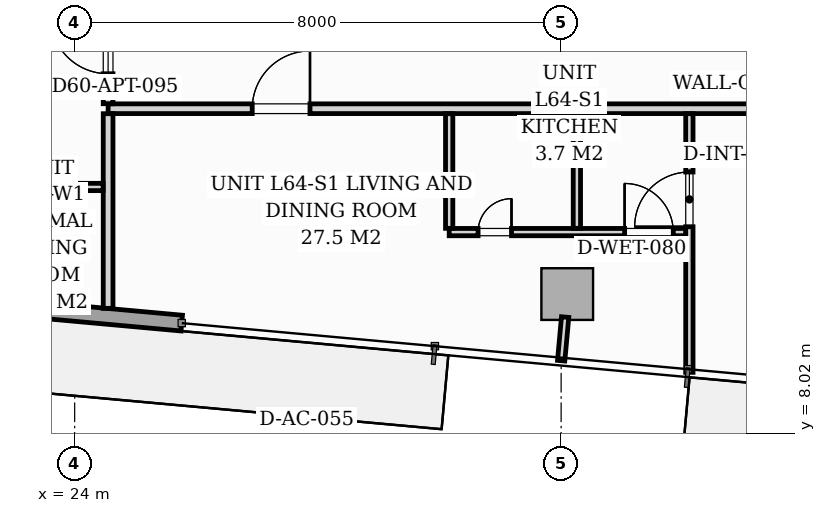
"""IFC4 building model, lengths in metres.
Left out: names, types, materials, properties, quantities, classifications, styles, units other than length and angle.
Written with IfcOpenShell. Run it as: python <this file> out.ifc"""

import sys

from ifc_helpers import new_model, si_unit, direction, frame, frame_2d, origin, origin_2d, place, context, subcontext, project, spatial, rectangle, extrude, source, transform, mapped, element, fill, save


model = new_model("IFC4")
c1 = context("Model", 3, precision=1e-05, world=origin(), true_north=direction((0.0, 1.0)))
c2 = subcontext(c1, "Body", "Model", "MODEL_VIEW")
j1 = project(units=[si_unit("LENGTHUNIT", "METRE"), si_unit("PLANEANGLEUNIT", "RADIAN")], contexts=[c1])
p1 = place(None, origin())
s1 = spatial("IfcSite", under=j1, at=p1, CompositionType="ELEMENT")
p2 = place(p1, origin())
s2 = spatial("IfcBuilding", under=s1, at=p2, CompositionType="ELEMENT")
p3 = place(p2, frame((0.0, 0.0, 223.2)))
s3 = spatial("IfcBuildingStorey", under=s2, at=p3, CompositionType="ELEMENT", Elevation=223.2)
m1 = source(origin(), c2, "Body", "SweptSolid", [
    extrude(rectangle(XDim=0.85, YDim=0.85, at=origin_2d()), origin(), (0.0, 0.0, 1.0), 3.296),
])
p4 = place(p3, frame((32.1, 10.312, 0.002), z_axis=(0.0, 0.0, 1.0), x_axis=(0.995884398616, -0.090632580198, 0.0)))
e1 = element("IfcColumn", 1, at=p4, inside=s3, PredefinedType="COLUMN", context=c2, shape_type="MappedRepresentation", body=[
    mapped(m1, transform((0.0, 0.0, 0.0), scale=1.0)),
])
p5 = place(p3, frame((25.761, 9.834, 0.0), z_axis=(0.0, 0.0, 1.0), x_axis=(-0.995884584572, 0.090630536861, 0.0)))
e2 = element("IfcWall", 2, at=p5, inside=s3, PredefinedType="STANDARD", context=c2, shape_type="SweptSolid", body=[
    extrude(rectangle(XDim=14.63, YDim=0.26, at=frame_2d((7.315, 0.0))), origin(), (0.0, 0.0, 1.0), 3.04),
])
p6 = place(p5, frame((6.09, 0.0, 0.0)))
e3 = element("IfcOpeningElement", 3, at=p6, cuts=e2, PredefinedType="OPENING", context=c2, shape_type="SweptSolid", body=[
    extrude(rectangle(XDim=1.8, YDim=2.06, at=frame_2d((0.9, 1.03))), frame((0.0, 0.14, 0.0), z_axis=(0.0, -1.0, 0.0), x_axis=(1.0, 0.0, 0.0)), (0.0, 0.0, 1.0), 0.28),
])
p7 = place(p5, frame((8.35, 0.0, 0.65)))
e4 = element("IfcOpeningElement", 4, at=p7, cuts=e2, PredefinedType="OPENING", context=c2, shape_type="SweptSolid", body=[
    extrude(rectangle(XDim=1.6, YDim=1.5, at=frame_2d((0.8, 0.75))), frame((0.0, 0.14, 0.0), z_axis=(0.0, -1.0, 0.0), x_axis=(1.0, 0.0, 0.0)), (0.0, 0.0, 1.0), 0.28),
])
p8 = place(p3, frame((24.55, 13.36, 0.0), z_axis=(0.0, 0.0, 1.0), x_axis=(1.0, 0.0, 0.0)))
e5 = element("IfcWall", 5, at=p8, inside=s3, PredefinedType="PARTITIONING", context=c2, shape_type="SweptSolid", body=[
    extrude(rectangle(XDim=21.33, YDim=0.16, at=frame_2d((10.665, 0.0))), origin(), (0.0, 0.0, 1.0), 2.596),
])
p9 = place(p8, frame((2.37, 0.0, 0.0)))
e6 = element("IfcOpeningElement", 6, at=p9, cuts=e5, PredefinedType="OPENING", context=c2, shape_type="SweptSolid", body=[
    extrude(rectangle(XDim=0.95, YDim=2.06, at=frame_2d((0.475, 1.03))), frame((0.0, 0.09, 0.0), z_axis=(0.0, -1.0, 0.0), x_axis=(1.0, 0.0, 0.0)), (0.0, 0.0, 1.0), 0.18),
])
p10 = place(p8, frame((13.707, 0.0, 0.0)))
e7 = element("IfcOpeningElement", 7, at=p10, cuts=e5, PredefinedType="OPENING", context=c2, shape_type="SweptSolid", body=[
    extrude(rectangle(XDim=0.95, YDim=2.06, at=frame_2d((0.475, 1.03))), frame((0.0, 0.09, 0.0), z_axis=(0.0, -1.0, 0.0), x_axis=(1.0, 0.0, 0.0)), (0.0, 0.0, 1.0), 0.18),
])
p11 = place(p3, frame((24.55, 10.077, 0.0), z_axis=(0.0, 0.0, 1.0), x_axis=(0.0, 1.0, 0.0)))
e8 = element("IfcWall", 8, at=p11, inside=s3, PredefinedType="PARTITIONING", context=c2, shape_type="SweptSolid", body=[
    extrude(rectangle(XDim=3.201, YDim=0.16, at=frame_2d((1.601, 0.0))), origin(), (0.0, 0.0, 1.0), 3.04),
])
p12 = place(p3, frame((24.55, 13.442, 0.0), z_axis=(0.0, 0.0, 1.0), x_axis=(0.0, 1.0, 0.0)))
e9 = element("IfcWall", 9, at=p12, inside=s3, PredefinedType="PARTITIONING", context=c2, shape_type="SweptSolid", body=[
    extrude(rectangle(XDim=7.208, YDim=0.16, at=frame_2d((3.604, 0.0))), origin(), (0.0, 0.0, 1.0), 3.04),
])
p13 = place(p12, frame((0.493, 0.0, 0.0)))
e10 = element("IfcOpeningElement", 10, at=p13, cuts=e9, PredefinedType="OPENING", context=c2, shape_type="SweptSolid", body=[
    extrude(rectangle(XDim=0.95, YDim=2.06, at=frame_2d((0.475, 1.03))), frame((0.0, 0.09, 0.0), z_axis=(0.0, -1.0, 0.0), x_axis=(1.0, 0.0, 0.0)), (0.0, 0.0, 1.0), 0.18),
])
p14 = place(p12, frame((4.721, 0.0, 0.0)))
e11 = element("IfcOpeningElement", 11, at=p14, cuts=e9, PredefinedType="OPENING", context=c2, shape_type="SweptSolid", body=[
    extrude(rectangle(XDim=0.95, YDim=2.06, at=frame_2d((0.475, 1.03))), frame((0.0, 0.09, 0.0), z_axis=(0.0, -1.0, 0.0), x_axis=(1.0, 0.0, 0.0)), (0.0, 0.0, 1.0), 0.18),
])
p15 = place(p3, frame((34.109, 9.024, 0.0), z_axis=(0.0, 0.0, 1.0), x_axis=(0.0, 1.0, 0.0)))
e12 = element("IfcWall", 12, at=p15, inside=s3, PredefinedType="PARTITIONING", context=c2, shape_type="SweptSolid", body=[
    extrude(rectangle(XDim=4.254, YDim=0.12, at=frame_2d((2.127, 0.0))), origin(), (0.0, 0.0, 1.0), 3.04),
])
p16 = place(p15, frame((2.395, 0.0, 0.0)))
e13 = element("IfcOpeningElement", 13, at=p16, cuts=e12, PredefinedType="OPENING", context=c2, shape_type="SweptSolid", body=[
    extrude(rectangle(XDim=0.9, YDim=2.05, at=frame_2d((0.45, 1.025))), frame((0.0, 0.07, 0.0), z_axis=(0.0, -1.0, 0.0), x_axis=(1.0, 0.0, 0.0)), (0.0, 0.0, 1.0), 0.14),
])
p17 = place(p3, frame((30.159, 11.331, 0.0), z_axis=(0.0, 0.0, 1.0), x_axis=(1.0, 0.0, 0.0)))
e14 = element("IfcWall", 14, at=p17, inside=s3, PredefinedType="PARTITIONING", context=c2, shape_type="SweptSolid", body=[
    extrude(rectangle(XDim=3.888, YDim=0.12, at=frame_2d((1.944, 0.0))), origin(), (0.0, 0.0, 1.0), 2.596),
])
p18 = place(p17, frame((0.475, 0.0, 0.0)))
e15 = element("IfcOpeningElement", 15, at=p18, cuts=e14, PredefinedType="OPENING", context=c2, shape_type="SweptSolid", body=[
    extrude(rectangle(XDim=0.55, YDim=2.0, at=frame_2d((0.275, 1.0))), frame((0.0, 0.07, 0.0), z_axis=(0.0, -1.0, 0.0), x_axis=(1.0, 0.0, 0.0)), (0.0, 0.0, 1.0), 0.14),
])
p19 = place(p17, frame((2.885, 0.0, 0.0)))
e16 = element("IfcOpeningElement", 16, at=p19, cuts=e14, PredefinedType="OPENING", context=c2, shape_type="SweptSolid", body=[
    extrude(rectangle(XDim=0.8, YDim=2.02, at=frame_2d((0.4, 1.01))), frame((0.0, 0.07, 0.0), z_axis=(0.0, -1.0, 0.0), x_axis=(1.0, 0.0, 0.0)), (0.0, 0.0, 1.0), 0.14),
])
p20 = place(p3, frame((32.259, 11.393, 0.0), z_axis=(0.0, 0.0, 1.0), x_axis=(0.0, 1.0, 0.0)))
e17 = element("IfcWall", 17, at=p20, inside=s3, PredefinedType="PARTITIONING", context=c2, shape_type="SweptSolid", body=[
    extrude(rectangle(XDim=1.885, YDim=0.12, at=frame_2d((0.942, 0.0))), origin(), (0.0, 0.0, 1.0), 2.4),
])
p21 = place(p3, frame((30.159, 11.393, 0.0), z_axis=(0.0, 0.0, 1.0), x_axis=(0.0, 1.0, 0.0)))
e18 = element("IfcWall", 18, at=p21, inside=s3, PredefinedType="PARTITIONING", context=c2, shape_type="SweptSolid", body=[
    extrude(rectangle(XDim=1.885, YDim=0.12, at=frame_2d((0.942, 0.0))), origin(), (0.0, 0.0, 1.0), 3.04),
])
p22 = place(p3, frame((13.643, 12.073, 0.0), z_axis=(0.0, 0.0, 1.0), x_axis=(1.0, 0.0, 0.0)))
e19 = element("IfcWall", 19, at=p22, inside=s3, PredefinedType="PARTITIONING", context=c2, shape_type="SweptSolid", body=[
    extrude(rectangle(XDim=10.825, YDim=0.12, at=frame_2d((5.413, 0.0))), origin(), (0.0, 0.0, 1.0), 2.483),
])
p23 = place(p22, frame((4.988, 0.0, 0.0)))
e20 = element("IfcOpeningElement", 20, at=p23, cuts=e19, PredefinedType="OPENING", context=c2, shape_type="SweptSolid", body=[
    extrude(rectangle(XDim=0.85, YDim=2.05, at=frame_2d((0.425, 1.025))), frame((0.0, 0.07, 0.0), z_axis=(0.0, -1.0, 0.0), x_axis=(1.0, 0.0, 0.0)), (0.0, 0.0, 1.0), 0.14),
])
p24 = place(p3, frame((32.066, 9.933, 0.0), z_axis=(0.0, 0.0, 1.0), x_axis=(-0.090872036342, -0.995862577373, 0.0)))
e21 = element("IfcWall", 21, at=p24, inside=s3, PredefinedType="PARTITIONING", context=c2, shape_type="SweptSolid", body=[
    extrude(rectangle(XDim=0.72, YDim=0.12, at=frame_2d((0.36, 0.0))), origin(), (0.0, 0.0, 1.0), 3.04),
])
m2 = source(origin(), c2, "Body", "SweptSolid", [
    extrude(rectangle(XDim=0.95, YDim=2.06, at=frame_2d((0.475, 1.03))), frame((0.0, 0.025, 0.0), z_axis=(0.0, -1.0, 0.0), x_axis=(1.0, 0.0, 0.0)), (0.0, 0.0, 1.0), 0.05),
])
p25 = place(p9, origin())
e22 = element("IfcDoor", 22, at=p25, inside=s3, OperationType="SINGLE_SWING_RIGHT", PredefinedType="DOOR", context=c2, shape_type="MappedRepresentation", body=[
    mapped(m2, transform((0.0, 0.0, 0.0), scale=1.0)),
])
fill(e6, e22)
m3 = source(origin(), c2, "Body", "SweptSolid", [
    extrude(rectangle(XDim=0.9, YDim=2.05, at=frame_2d((0.45, 1.025))), frame((0.0, 0.025, 0.0), z_axis=(0.0, -1.0, 0.0), x_axis=(1.0, 0.0, 0.0)), (0.0, 0.0, 1.0), 0.05),
])
p26 = place(p16, origin())
e23 = element("IfcDoor", 23, at=p26, inside=s3, OperationType="SINGLE_SWING_LEFT", PredefinedType="DOOR", context=c2, shape_type="MappedRepresentation", body=[
    mapped(m3, transform((0.0, 0.0, 0.0), scale=1.0)),
])
fill(e13, e23)
m4 = source(origin(), c2, "Body", "SweptSolid", [
    extrude(rectangle(XDim=0.55, YDim=2.0, at=frame_2d((0.275, 1.0))), frame((0.0, 0.025, 0.0), z_axis=(0.0, -1.0, 0.0), x_axis=(1.0, 0.0, 0.0)), (0.0, 0.0, 1.0), 0.05),
])
p27 = place(p18, origin())
e24 = element("IfcDoor", 24, at=p27, inside=s3, OperationType="SINGLE_SWING_RIGHT", PredefinedType="DOOR", context=c2, shape_type="MappedRepresentation", body=[
    mapped(m4, transform((0.0, 0.0, 0.0), scale=1.0)),
])
fill(e15, e24)
m5 = source(origin(), c2, "Body", "SweptSolid", [
    extrude(rectangle(XDim=0.8, YDim=2.02, at=frame_2d((0.4, 1.01))), frame((0.0, 0.025, 0.0), z_axis=(0.0, -1.0, 0.0), x_axis=(1.0, 0.0, 0.0)), (0.0, 0.0, 1.0), 0.05),
])
p28 = place(p19, origin())
e25 = element("IfcDoor", 25, at=p28, inside=s3, OperationType="SINGLE_SWING_LEFT", PredefinedType="DOOR", context=c2, shape_type="MappedRepresentation", body=[
    mapped(m5, transform((0.0, 0.0, 0.0), scale=1.0)),
])
fill(e16, e25)
p29 = place(p13, origin())
e26 = element("IfcDoor", 26, at=p29, inside=s3, OperationType="SINGLE_SWING_RIGHT", PredefinedType="DOOR", context=c2, shape_type="MappedRepresentation", body=[
    mapped(m2, transform((0.0, 0.0, 0.0), scale=1.0)),
])
fill(e10, e26)
save(model, sys.argv[1])
